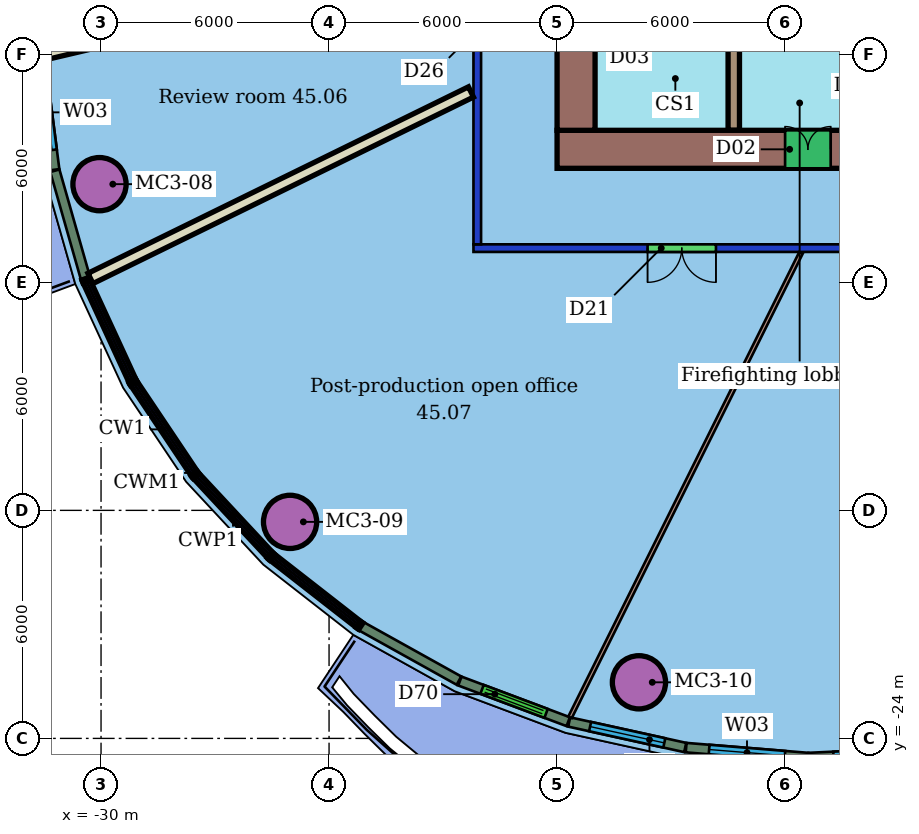
"""IFC4 building model, lengths in metres.
Left out: names, types, materials, properties, quantities, classifications, styles, units other than length and angle.
Written with IfcOpenShell. Run it as: python <this file> out.ifc"""

import sys

from ifc_helpers import new_model, si_unit, direction, frame, frame_2d, origin, origin_2d, place, context, subcontext, project, spatial, rectangle, hollow_circle, extrude, element, fill, save


model = new_model("IFC4")
c1 = context("Model", 3, precision=1e-05, world=origin(), true_north=direction((0.0, 1.0)))
c2 = subcontext(c1, "Body", "Model", "MODEL_VIEW")
j1 = project(units=[si_unit("LENGTHUNIT", "METRE"), si_unit("PLANEANGLEUNIT", "RADIAN")], contexts=[c1])
p1 = place(None, origin())
s1 = spatial("IfcSite", under=j1, at=p1, CompositionType="ELEMENT")
p2 = place(p1, origin())
s2 = spatial("IfcBuilding", under=s1, at=p2, CompositionType="ELEMENT")
p3 = place(p2, frame((0.0, 0.0, 186.6)))
s3 = spatial("IfcBuildingStorey", under=s2, at=p3, CompositionType="ELEMENT", Elevation=186.6)
for number, where, z_axis, x_axis in (
    (1, (-30.041, -9.417, 0.0), (0.0, 0.0, 1.0), (1.0, 0.0, 0.0)),
    (2, (-25.026, -18.303, 0.0), (0.0, 0.0, 1.0), (1.0, 0.0, 0.0)),
    (3, (-15.845, -22.524, 0.0), (0.0, 0.0, 1.0), (1.0, 0.0, 0.0)),
):
    element("IfcColumn", number, at=place(p3, frame(where, z_axis=z_axis, x_axis=x_axis)), inside=s3, PredefinedType="COLUMN", context=c2, shape_type="SweptSolid", body=[
        extrude(hollow_circle(Radius=0.7, WallThickness=0.05, at=origin_2d()), origin(), (0.0, 0.0, 1.0), 3.4),
    ])
p4 = place(p3, frame((8.2, -11.1, 0.0), z_axis=(0.0, 0.0, 1.0), x_axis=(-1.0, 0.0, 0.0)))
e4 = element("IfcWall", 4, at=p4, inside=s3, PredefinedType="PARTITIONING", context=c2, shape_type="SweptSolid", body=[
    extrude(rectangle(XDim=28.4, YDim=0.2, at=frame_2d((14.2, 0.0))), origin(), (0.0, 0.0, 1.0), 3.0),
])
p5 = place(p4, frame((22.019, 0.0, 0.0)))
e5 = element("IfcOpeningElement", 5, at=p5, cuts=e4, PredefinedType="OPENING", context=c2, shape_type="SweptSolid", body=[
    extrude(rectangle(XDim=1.8, YDim=2.1, at=frame_2d((0.9, 1.05))), frame((0.0, 0.11, 0.0), z_axis=(0.0, -1.0, 0.0), x_axis=(1.0, 0.0, 0.0)), (0.0, 0.0, 1.0), 0.22),
])
p6 = place(p4, frame((14.8, 0.0, 0.0)))
e6 = element("IfcOpeningElement", 6, at=p6, cuts=e4, PredefinedType="OPENING", context=c2, shape_type="SweptSolid", body=[
    extrude(rectangle(XDim=1.8, YDim=2.1, at=frame_2d((0.9, 1.05))), frame((0.0, 0.11, 0.0), z_axis=(0.0, -1.0, 0.0), x_axis=(1.0, 0.0, 0.0)), (0.0, 0.0, 1.0), 0.22),
])
p7 = place(p4, frame((5.278, 0.0, 0.0)))
e7 = element("IfcOpeningElement", 7, at=p7, cuts=e4, PredefinedType="OPENING", context=c2, shape_type="SweptSolid", body=[
    extrude(rectangle(XDim=1.0, YDim=2.1, at=frame_2d((0.5, 1.05))), frame((0.0, 0.11, 0.0), z_axis=(0.0, -1.0, 0.0), x_axis=(1.0, 0.0, 0.0)), (0.0, 0.0, 1.0), 0.22),
])
p8 = place(p3, frame((-20.1, -11.0, 0.0), z_axis=(0.0, 0.0, 1.0), x_axis=(0.0, 1.0, 0.0)))
e8 = element("IfcWall", 8, at=p8, inside=s3, PredefinedType="PARTITIONING", context=c2, shape_type="SweptSolid", body=[
    extrude(rectangle(XDim=22.0, YDim=0.2, at=frame_2d((11.0, 0.0))), origin(), (0.0, 0.0, 1.0), 3.0),
])
p9 = place(p8, frame((15.096, 0.0, 0.0)))
e9 = element("IfcOpeningElement", 9, at=p9, cuts=e8, PredefinedType="OPENING", context=c2, shape_type="SweptSolid", body=[
    extrude(rectangle(XDim=1.2, YDim=2.1, at=frame_2d((0.6, 1.05))), frame((0.0, 0.11, 0.0), z_axis=(0.0, -1.0, 0.0), x_axis=(1.0, 0.0, 0.0)), (0.0, 0.0, 1.0), 0.22),
])
p10 = place(p8, frame((9.122, 0.0, 0.0)))
e10 = element("IfcOpeningElement", 10, at=p10, cuts=e8, PredefinedType="OPENING", context=c2, shape_type="SweptSolid", body=[
    extrude(rectangle(XDim=1.2, YDim=2.1, at=frame_2d((0.6, 1.05))), frame((0.0, 0.11, 0.0), z_axis=(0.0, -1.0, 0.0), x_axis=(1.0, 0.0, 0.0)), (0.0, 0.0, 1.0), 0.22),
])
p11 = place(p8, frame((5.534, 0.0, 0.0)))
e11 = element("IfcOpeningElement", 11, at=p11, cuts=e8, PredefinedType="OPENING", context=c2, shape_type="SweptSolid", body=[
    extrude(rectangle(XDim=1.2, YDim=2.1, at=frame_2d((0.6, 1.05))), frame((0.0, 0.11, 0.0), z_axis=(0.0, -1.0, 0.0), x_axis=(1.0, 0.0, 0.0)), (0.0, 0.0, 1.0), 0.22),
])
p12 = place(p3, frame((-31.488, -5.997, 0.0), z_axis=(0.0, 0.0, 1.0), x_axis=(0.973420214801, 0.229026385853, 0.0)))
e12 = element("IfcWall", 12, at=p12, inside=s3, PredefinedType="PARTITIONING", context=c2, shape_type="SweptSolid", body=[
    extrude(rectangle(XDim=11.561, YDim=0.3, at=frame_2d((5.78, 0.0))), origin(), (0.0, 0.0, 1.0), 3.4),
])
p13 = place(p3, frame((-30.279, -11.897, 0.0), z_axis=(0.0, 0.0, 1.0), x_axis=(0.897980611591, 0.440035022704, 0.0)))
e13 = element("IfcWall", 13, at=p13, inside=s3, PredefinedType="PARTITIONING", context=c2, shape_type="SweptSolid", body=[
    extrude(rectangle(XDim=11.15, YDim=0.3, at=frame_2d((5.575, 0.0))), origin(), (0.0, 0.0, 1.0), 3.4),
])
p14 = place(p3, frame((-17.659, -23.445, 0.0), z_axis=(0.0, 0.0, 1.0), x_axis=(0.445259511275, 0.8954015678, 0.0)))
e14 = element("IfcWall", 14, at=p14, inside=s3, PredefinedType="PARTITIONING", context=c2, shape_type="SweptSolid", body=[
    extrude(rectangle(XDim=13.651, YDim=0.1, at=frame_2d((6.825, 0.0))), origin(), (0.0, 0.0, 1.0), 3.4),
])
p15 = place(p3, frame((-31.611, -6.017, 0.0), z_axis=(0.0, 0.0, 1.0), x_axis=(0.128108697177, -0.991760133151, 0.0)))
e15 = element("IfcWall", 15, at=p15, inside=s3, PredefinedType="SOLIDWALL", context=c2, shape_type="SweptSolid", body=[
    extrude(rectangle(XDim=3.045, YDim=0.25, at=frame_2d((1.523, 0.0))), origin(), (0.0, 0.0, 1.0), 3.05),
])
p16 = place(p15, frame((0.523, 0.0, 0.9)))
e16 = element("IfcOpeningElement", 16, at=p16, cuts=e15, PredefinedType="OPENING", context=c2, shape_type="SweptSolid", body=[
    extrude(rectangle(XDim=2.0, YDim=2.1, at=frame_2d((1.0, 1.05))), frame((0.0, 0.135, 0.0), z_axis=(0.0, -1.0, 0.0), x_axis=(1.0, 0.0, 0.0)), (0.0, 0.0, 1.0), 0.27),
])
for number, where, z_axis, x_axis in (
    (17, (-31.216, -9.063, 0.0), (0.0, 0.0, 1.0), (0.274, -0.962, 0.0)),
    (18, (-23.148, -21.052, 0.0), (0.0, 0.0, 1.0), (0.874, -0.486, 0.0)),
):
    element("IfcWall", number, at=place(p3, frame(where, z_axis=z_axis, x_axis=x_axis)), inside=s3, PredefinedType="SOLIDWALL", context=c2, shape_type="SweptSolid", body=[
        extrude(rectangle(XDim=2.937, YDim=0.25, at=frame_2d((1.468, 0.0))), origin(), (0.0, 0.0, 1.0), 3.05),
    ])
p17 = place(p3, frame((-20.558, -22.491, 0.0), z_axis=(0.0, 0.0, 1.0), x_axis=(0.936302820001, -0.351193720413, 0.0)))
e19 = element("IfcWall", 19, at=p17, inside=s3, PredefinedType="SOLIDWALL", context=c2, shape_type="SweptSolid", body=[
    extrude(rectangle(XDim=3.046, YDim=0.25, at=frame_2d((1.523, 0.0))), origin(), (0.0, 0.0, 1.0), 3.05),
])
p18 = place(p17, frame((0.623, 0.0, 0.0)))
e20 = element("IfcOpeningElement", 20, at=p18, cuts=e19, PredefinedType="OPENING", context=c2, shape_type="SweptSolid", body=[
    extrude(rectangle(XDim=1.8, YDim=2.4, at=frame_2d((0.9, 1.2))), frame((0.0, 0.135, 0.0), z_axis=(0.0, -1.0, 0.0), x_axis=(1.0, 0.0, 0.0)), (0.0, 0.0, 1.0), 0.27),
])
p19 = place(p3, frame((-17.681, -23.568, 0.0), z_axis=(0.0, 0.0, 1.0), x_axis=(0.976666093786, -0.214763454175, 0.0)))
e21 = element("IfcWall", 21, at=p19, inside=s3, PredefinedType="SOLIDWALL", context=c2, shape_type="SweptSolid", body=[
    extrude(rectangle(XDim=3.126, YDim=0.25, at=frame_2d((1.563, 0.0))), origin(), (0.0, 0.0, 1.0), 3.05),
])
p20 = place(p19, frame((0.563, 0.0, 0.9)))
e22 = element("IfcOpeningElement", 22, at=p20, cuts=e21, PredefinedType="OPENING", context=c2, shape_type="SweptSolid", body=[
    extrude(rectangle(XDim=2.0, YDim=2.1, at=frame_2d((1.0, 1.05))), frame((0.0, 0.135, 0.0), z_axis=(0.0, -1.0, 0.0), x_axis=(1.0, 0.0, 0.0)), (0.0, 0.0, 1.0), 0.27),
])
p21 = place(p3, frame((-14.604, -24.243, 0.0), z_axis=(0.0, 0.0, 1.0), x_axis=(0.996696549615, -0.081215688051, 0.0)))
e23 = element("IfcWall", 23, at=p21, inside=s3, PredefinedType="SOLIDWALL", context=c2, shape_type="SweptSolid", body=[
    extrude(rectangle(XDim=3.213, YDim=0.25, at=frame_2d((1.607, 0.0))), origin(), (0.0, 0.0, 1.0), 3.05),
])
p22 = place(p21, frame((0.607, 0.0, 0.9)))
e24 = element("IfcOpeningElement", 24, at=p22, cuts=e23, PredefinedType="OPENING", context=c2, shape_type="SweptSolid", body=[
    extrude(rectangle(XDim=2.0, YDim=2.1, at=frame_2d((1.0, 1.05))), frame((0.0, 0.135, 0.0), z_axis=(0.0, -1.0, 0.0), x_axis=(1.0, 0.0, 0.0)), (0.0, 0.0, 1.0), 0.27),
])
p23 = place(p3, frame((-11.377, -24.504, 0.0), z_axis=(0.0, 0.0, 1.0), x_axis=(0.998890112475, 0.047101413994, 0.0)))
e25 = element("IfcWall", 25, at=p23, inside=s3, PredefinedType="SOLIDWALL", context=c2, shape_type="SweptSolid", body=[
    extrude(rectangle(XDim=3.302, YDim=0.25, at=frame_2d((1.651, 0.0))), origin(), (0.0, 0.0, 1.0), 3.05),
])
p24 = place(p23, frame((0.651, 0.0, 0.9)))
e26 = element("IfcOpeningElement", 26, at=p24, cuts=e25, PredefinedType="OPENING", context=c2, shape_type="SweptSolid", body=[
    extrude(rectangle(XDim=2.0, YDim=2.1, at=frame_2d((1.0, 1.05))), frame((0.0, 0.135, 0.0), z_axis=(0.0, -1.0, 0.0), x_axis=(1.0, 0.0, 0.0)), (0.0, 0.0, 1.0), 0.27),
])
p25 = place(p3, frame((-18.0, -8.5, 0.0), z_axis=(0.0, 0.0, 1.0), x_axis=(1.0, 0.0, 0.0)))
e27 = element("IfcWall", 27, at=p25, inside=s3, PredefinedType="SHEAR", context=c2, shape_type="SweptSolid", body=[
    extrude(rectangle(XDim=24.0, YDim=1.0, at=frame_2d((12.0, 0.0))), origin(), (0.0, 0.0, 1.0), 3.15),
])
p26 = place(p25, frame((6.0, 0.0, 0.0)))
e28 = element("IfcOpeningElement", 28, at=p26, cuts=e27, PredefinedType="OPENING", context=c2, shape_type="SweptSolid", body=[
    extrude(rectangle(XDim=1.2, YDim=2.1, at=frame_2d((0.6, 1.05))), frame((0.0, 0.51, 0.0), z_axis=(0.0, -1.0, 0.0), x_axis=(1.0, 0.0, 0.0)), (0.0, 0.0, 1.0), 1.02),
])
p27 = place(p3, frame((-17.5, 8.0, 0.0), z_axis=(0.0, 0.0, 1.0), x_axis=(0.0, -1.0, 0.0)))
e29 = element("IfcWall", 29, at=p27, inside=s3, PredefinedType="SHEAR", context=c2, shape_type="SweptSolid", body=[
    extrude(rectangle(XDim=16.0, YDim=1.0, at=frame_2d((8.0, 0.0))), origin(), (0.0, 0.0, 1.0), 3.15),
])
p28 = place(p27, frame((11.9, 0.0, 0.0)))
e30 = element("IfcOpeningElement", 30, at=p28, cuts=e29, PredefinedType="OPENING", context=c2, shape_type="SweptSolid", body=[
    extrude(rectangle(XDim=1.2, YDim=2.1, at=frame_2d((0.6, 1.05))), frame((0.0, 0.51, 0.0), z_axis=(0.0, -1.0, 0.0), x_axis=(1.0, 0.0, 0.0)), (0.0, 0.0, 1.0), 1.02),
])
p29 = place(p27, frame((2.9, 0.0, 0.0)))
e31 = element("IfcOpeningElement", 31, at=p29, cuts=e29, PredefinedType="OPENING", context=c2, shape_type="SweptSolid", body=[
    extrude(rectangle(XDim=1.2, YDim=2.1, at=frame_2d((0.6, 1.05))), frame((0.0, 0.51, 0.0), z_axis=(0.0, -1.0, 0.0), x_axis=(1.0, 0.0, 0.0)), (0.0, 0.0, 1.0), 1.02),
])
p30 = place(p3, frame((-13.35, 8.0, 0.0), z_axis=(0.0, 0.0, 1.0), x_axis=(0.0, -1.0, 0.0)))
e32 = element("IfcWall", 32, at=p30, inside=s3, PredefinedType="SHEAR", context=c2, shape_type="SweptSolid", body=[
    extrude(rectangle(XDim=16.0, YDim=0.3, at=frame_2d((8.0, 0.0))), origin(), (0.0, 0.0, 1.0), 3.15),
])
p31 = place(p30, frame((7.25, 0.0, 0.0)))
e33 = element("IfcOpeningElement", 33, at=p31, cuts=e32, PredefinedType="OPENING", context=c2, shape_type="SweptSolid", body=[
    extrude(rectangle(XDim=1.5, YDim=2.1, at=frame_2d((0.75, 1.05))), frame((0.0, 0.16, 0.0), z_axis=(0.0, -1.0, 0.0), x_axis=(1.0, 0.0, 0.0)), (0.0, 0.0, 1.0), 0.32),
])
p32 = place(p5, origin())
e34 = element("IfcDoor", 34, at=p32, inside=s3, OperationType="DOUBLE_DOOR_SINGLE_SWING", PredefinedType="DOOR", context=c2, shape_type="SweptSolid", body=[
    extrude(rectangle(XDim=1.8, YDim=2.1, at=frame_2d((0.9, 1.05))), frame((0.0, 0.025, 0.0), z_axis=(0.0, -1.0, 0.0), x_axis=(1.0, 0.0, 0.0)), (0.0, 0.0, 1.0), 0.05),
])
fill(e5, e34)
p33 = place(p16, origin())
e35 = element("IfcWindow", 35, at=p33, inside=s3, PartitioningType="SINGLE_PANEL", PredefinedType="WINDOW", context=c2, shape_type="SweptSolid", body=[
    extrude(rectangle(XDim=2.0, YDim=2.1, at=frame_2d((1.0, 1.05))), frame((0.0, 0.03, 0.0), z_axis=(0.0, -1.0, 0.0), x_axis=(1.0, 0.0, 0.0)), (0.0, 0.0, 1.0), 0.06),
])
fill(e16, e35)
p34 = place(p18, origin())
e36 = element("IfcDoor", 36, at=p34, inside=s3, OperationType="DOUBLE_DOOR_SLIDING", PredefinedType="DOOR", context=c2, shape_type="SweptSolid", body=[
    extrude(rectangle(XDim=1.8, YDim=2.4, at=frame_2d((0.9, 1.2))), frame((0.0, 0.025, 0.0), z_axis=(0.0, -1.0, 0.0), x_axis=(1.0, 0.0, 0.0)), (0.0, 0.0, 1.0), 0.05),
])
fill(e20, e36)
p35 = place(p20, origin())
e37 = element("IfcWindow", 37, at=p35, inside=s3, PartitioningType="SINGLE_PANEL", PredefinedType="WINDOW", context=c2, shape_type="SweptSolid", body=[
    extrude(rectangle(XDim=2.0, YDim=2.1, at=frame_2d((1.0, 1.05))), frame((0.0, 0.03, 0.0), z_axis=(0.0, -1.0, 0.0), x_axis=(1.0, 0.0, 0.0)), (0.0, 0.0, 1.0), 0.06),
])
fill(e22, e37)
p36 = place(p22, origin())
e38 = element("IfcWindow", 38, at=p36, inside=s3, PartitioningType="SINGLE_PANEL", PredefinedType="WINDOW", context=c2, shape_type="SweptSolid", body=[
    extrude(rectangle(XDim=2.0, YDim=2.1, at=frame_2d((1.0, 1.05))), frame((0.0, 0.03, 0.0), z_axis=(0.0, -1.0, 0.0), x_axis=(1.0, 0.0, 0.0)), (0.0, 0.0, 1.0), 0.06),
])
fill(e24, e38)
p37 = place(p24, origin())
e39 = element("IfcWindow", 39, at=p37, inside=s3, PartitioningType="SINGLE_PANEL", PredefinedType="WINDOW", context=c2, shape_type="SweptSolid", body=[
    extrude(rectangle(XDim=2.0, YDim=2.1, at=frame_2d((1.0, 1.05))), frame((0.0, 0.03, 0.0), z_axis=(0.0, -1.0, 0.0), x_axis=(1.0, 0.0, 0.0)), (0.0, 0.0, 1.0), 0.06),
])
fill(e26, e39)
p38 = place(p26, origin())
e40 = element("IfcDoor", 40, at=p38, inside=s3, OperationType="DOUBLE_DOOR_SINGLE_SWING", PredefinedType="NOTDEFINED", context=c2, shape_type="SweptSolid", body=[
    extrude(rectangle(XDim=1.2, YDim=2.1, at=frame_2d((0.6, 1.05))), frame((0.0, 0.025, 0.0), z_axis=(0.0, -1.0, 0.0), x_axis=(1.0, 0.0, 0.0)), (0.0, 0.0, 1.0), 0.05),
])
fill(e28, e40)
save(model, sys.argv[1])
